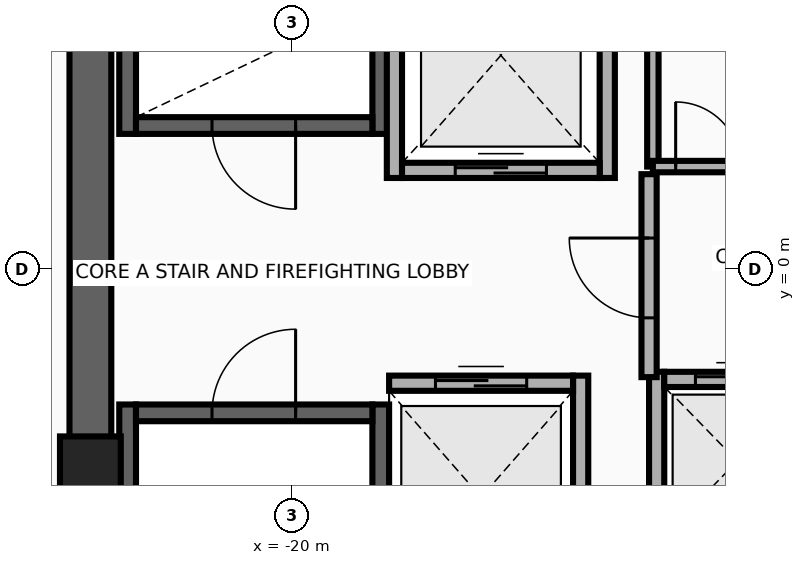
"""IFC4 building model, lengths in metres.
Left out: names, types, materials, properties, quantities, classifications, styles, units other than length and angle.
Written with IfcOpenShell. Run it as: python <this file> out.ifc"""

import sys

from ifc_helpers import new_model, si_unit, direction, frame, frame_2d, origin, origin_2d, place, context, subcontext, project, spatial, rectangle, extrude, source, transform, mapped, element, fill, save


model = new_model("IFC4")
c1 = context("Model", 3, precision=1e-05, world=origin(), true_north=direction((0.0, 1.0)))
c2 = subcontext(c1, "Body", "Model", "MODEL_VIEW")
j1 = project(units=[si_unit("LENGTHUNIT", "METRE"), si_unit("PLANEANGLEUNIT", "RADIAN")], contexts=[c1])
p1 = place(None, origin())
s1 = spatial("IfcSite", under=j1, at=p1, CompositionType="ELEMENT")
p2 = place(p1, origin())
s2 = spatial("IfcBuilding", under=s1, at=p2, CompositionType="ELEMENT")
p3 = place(p2, frame((0.0, 0.0, 244.0)))
s3 = spatial("IfcBuildingStorey", under=s2, at=p3, CompositionType="ELEMENT", Elevation=244.0)
for number, where, z_axis, x_axis in (
    (1, (-22.16, 1.78, 0.0), (0.0, 0.0, 1.0), (0.0, 1.0, 0.0)),
    (2, (-18.83, 1.78, 0.0), (0.0, 0.0, 1.0), (0.0, 1.0, 0.0)),
):
    element("IfcWall", number, at=place(p3, frame(where, z_axis=z_axis, x_axis=x_axis)), inside=s3, PredefinedType="SHEAR", context=c2, shape_type="SweptSolid", body=[
        extrude(rectangle(XDim=8.745, YDim=0.22, at=frame_2d((4.373, 0.0))), origin(), (0.0, 0.0, 1.0), 3.26),
    ])
p4 = place(p3, frame((-22.05, 1.89, 0.0), z_axis=(0.0, 0.0, 1.0), x_axis=(1.0, 0.0, 0.0)))
e3 = element("IfcWall", 3, at=p4, inside=s3, PredefinedType="SHEAR", context=c2, shape_type="SweptSolid", body=[
    extrude(rectangle(XDim=3.11, YDim=0.22, at=frame_2d((1.555, 0.0))), origin(), (0.0, 0.0, 1.0), 3.26),
])
p5 = place(p4, frame((1.0, 0.0, 0.0)))
e4 = element("IfcOpeningElement", 4, at=p5, cuts=e3, PredefinedType="OPENING", context=c2, shape_type="SweptSolid", body=[
    extrude(rectangle(XDim=1.1, YDim=2.15, at=frame_2d((0.55, 1.075))), frame((0.0, 0.125, 0.0), z_axis=(0.0, -1.0, 0.0), x_axis=(1.0, 0.0, 0.0)), (0.0, 0.0, 1.0), 0.25),
])
for number, where, z_axis, x_axis in (
    (5, (-22.16, -10.525, 0.0), (0.0, 0.0, 1.0), (0.0, 1.0, 0.0)),
    (6, (-18.83, -10.525, 0.0), (0.0, 0.0, 1.0), (0.0, 1.0, 0.0)),
):
    element("IfcWall", number, at=place(p3, frame(where, z_axis=z_axis, x_axis=x_axis)), inside=s3, PredefinedType="SHEAR", context=c2, shape_type="SweptSolid", body=[
        extrude(rectangle(XDim=8.745, YDim=0.22, at=frame_2d((4.373, 0.0))), origin(), (0.0, 0.0, 1.0), 3.26),
    ])
p6 = place(p3, frame((-22.05, -1.89, 0.0), z_axis=(0.0, 0.0, 1.0), x_axis=(1.0, 0.0, 0.0)))
e7 = element("IfcWall", 7, at=p6, inside=s3, PredefinedType="SHEAR", context=c2, shape_type="SweptSolid", body=[
    extrude(rectangle(XDim=3.11, YDim=0.22, at=frame_2d((1.555, 0.0))), origin(), (0.0, 0.0, 1.0), 3.26),
])
p7 = place(p6, frame((1.0, 0.0, 0.0)))
e8 = element("IfcOpeningElement", 8, at=p7, cuts=e7, PredefinedType="OPENING", context=c2, shape_type="SweptSolid", body=[
    extrude(rectangle(XDim=1.1, YDim=2.15, at=frame_2d((0.55, 1.075))), frame((0.0, 0.125, 0.0), z_axis=(0.0, -1.0, 0.0), x_axis=(1.0, 0.0, 0.0)), (0.0, 0.0, 1.0), 0.25),
])
p8 = place(p3, frame((-22.65, -11.075, 0.0), z_axis=(0.0, 0.0, 1.0), x_axis=(0.0, 1.0, 0.0)))
e9 = element("IfcWall", 9, at=p8, inside=s3, PredefinedType="SHEAR", context=c2, shape_type="SweptSolid", body=[
    extrude(rectangle(XDim=22.15, YDim=0.55, at=frame_2d((11.075, 0.0))), origin(), (0.0, 0.0, 1.0), 3.26),
])
m1 = source(origin(), c2, "Body", "SweptSolid", [
    extrude(rectangle(XDim=0.8, YDim=0.8, at=origin_2d()), origin(), (0.0, 0.0, 1.0), 3.5),
])
p9 = place(p3, frame((-22.65, -2.6, 0.0), z_axis=(0.0, 0.0, 1.0), x_axis=(1.0, 0.0, 0.0)))
e10 = element("IfcColumn", 10, at=p9, inside=s3, PredefinedType="COLUMN", context=c2, shape_type="MappedRepresentation", body=[
    mapped(m1, transform((0.0, 0.0, 0.0), x_axis=(1.0, 0.0, 0.0), y_axis=(0.0, 1.0, 0.0), z_axis=(0.0, 0.0, 1.0), scale=1.0)),
])
for number, where, z_axis, x_axis in (
    (11, (-18.65, 1.2, 0.0), (0.0, 0.0, 1.0), (0.0, 1.0, 0.0)),
    (12, (-15.85, 1.2, 0.0), (0.0, 0.0, 1.0), (0.0, 1.0, 0.0)),
):
    element("IfcWall", number, at=place(p3, frame(where, z_axis=z_axis, x_axis=x_axis)), inside=s3, PredefinedType="MOVABLE", context=c2, shape_type="SweptSolid", body=[
        extrude(rectangle(XDim=3.225, YDim=0.2, at=frame_2d((1.613, 0.0))), origin(), (0.0, 0.0, 1.0), 3.26),
    ])
p10 = place(p3, frame((-18.55, 1.3, 0.0), z_axis=(0.0, 0.0, 1.0), x_axis=(1.0, 0.0, 0.0)))
e13 = element("IfcWall", 13, at=p10, inside=s3, PredefinedType="MOVABLE", context=c2, shape_type="SweptSolid", body=[
    extrude(rectangle(XDim=2.6, YDim=0.2, at=frame_2d((1.3, 0.0))), origin(), (0.0, 0.0, 1.0), 3.26),
])
p11 = place(p10, frame((0.7, 0.0, 0.0)))
e14 = element("IfcOpeningElement", 14, at=p11, cuts=e13, PredefinedType="OPENING", context=c2, shape_type="SweptSolid", body=[
    extrude(rectangle(XDim=1.2, YDim=2.1, at=frame_2d((0.6, 1.05))), frame((0.0, 0.115, 0.0), z_axis=(0.0, -1.0, 0.0), x_axis=(1.0, 0.0, 0.0)), (0.0, 0.0, 1.0), 0.23),
])
p12 = place(p3, frame((-16.2, -4.6, 0.0), z_axis=(0.0, 0.0, 1.0), x_axis=(0.0, 1.0, 0.0)))
e15 = element("IfcWall", 15, at=p12, inside=s3, PredefinedType="MOVABLE", context=c2, shape_type="SweptSolid", body=[
    extrude(rectangle(XDim=3.2, YDim=0.2, at=frame_2d((1.6, 0.0))), origin(), (0.0, 0.0, 1.0), 3.26),
])
p13 = place(p3, frame((-18.72, -1.5, 0.0), z_axis=(0.0, 0.0, 1.0), x_axis=(1.0, 0.0, 0.0)))
e16 = element("IfcWall", 16, at=p13, inside=s3, PredefinedType="MOVABLE", context=c2, shape_type="SweptSolid", body=[
    extrude(rectangle(XDim=2.42, YDim=0.2, at=frame_2d((1.21, 0.0))), origin(), (0.0, 0.0, 1.0), 3.26),
])
p14 = place(p13, frame((0.61, 0.0, 0.0)))
e17 = element("IfcOpeningElement", 17, at=p14, cuts=e16, PredefinedType="OPENING", context=c2, shape_type="SweptSolid", body=[
    extrude(rectangle(XDim=1.2, YDim=2.1, at=frame_2d((0.6, 1.05))), frame((0.0, 0.115, 0.0), z_axis=(0.0, -1.0, 0.0), x_axis=(1.0, 0.0, 0.0)), (0.0, 0.0, 1.0), 0.23),
])
p15 = place(p3, frame((-15.2, -3.7, 0.0), z_axis=(0.0, 0.0, 1.0), x_axis=(0.0, 1.0, 0.0)))
e18 = element("IfcWall", 18, at=p15, inside=s3, PredefinedType="MOVABLE", context=c2, shape_type="SweptSolid", body=[
    extrude(rectangle(XDim=2.35, YDim=0.2, at=frame_2d((1.175, 0.0))), origin(), (0.0, 0.0, 1.0), 3.26),
])
p16 = place(p3, frame((-15.1, -1.45, 0.0), z_axis=(0.0, 0.0, 1.0), x_axis=(1.0, 0.0, 0.0)))
e19 = element("IfcWall", 19, at=p16, inside=s3, PredefinedType="MOVABLE", context=c2, shape_type="SweptSolid", body=[
    extrude(rectangle(XDim=1.92, YDim=0.2, at=frame_2d((0.96, 0.0))), origin(), (0.0, 0.0, 1.0), 3.26),
])
p17 = place(p16, frame((0.41, 0.0, 0.0)))
e20 = element("IfcOpeningElement", 20, at=p17, cuts=e19, PredefinedType="OPENING", context=c2, shape_type="SweptSolid", body=[
    extrude(rectangle(XDim=1.1, YDim=2.1, at=frame_2d((0.55, 1.05))), frame((0.0, 0.115, 0.0), z_axis=(0.0, -1.0, 0.0), x_axis=(1.0, 0.0, 0.0)), (0.0, 0.0, 1.0), 0.23),
])
p18 = place(p3, frame((-15.3, -1.42, 0.0), z_axis=(0.0, 0.0, 1.0), x_axis=(0.0, 1.0, 0.0)))
e21 = element("IfcWall", 21, at=p18, inside=s3, PredefinedType="PARTITIONING", context=c2, shape_type="SweptSolid", body=[
    extrude(rectangle(XDim=2.67, YDim=0.2, at=frame_2d((1.335, 0.0))), origin(), (0.0, 0.0, 1.0), 3.26),
])
p19 = place(p18, frame((0.78, 0.0, 0.0)))
e22 = element("IfcOpeningElement", 22, at=p19, cuts=e21, PredefinedType="OPENING", context=c2, shape_type="SweptSolid", body=[
    extrude(rectangle(XDim=1.05, YDim=2.15, at=frame_2d((0.525, 1.075))), frame((0.0, 0.115, 0.0), z_axis=(0.0, -1.0, 0.0), x_axis=(1.0, 0.0, 0.0)), (0.0, 0.0, 1.0), 0.23),
])
p20 = place(p3, frame((-15.25, 1.35, 0.0), z_axis=(0.0, 0.0, 1.0), x_axis=(0.0, 1.0, 0.0)))
e23 = element("IfcWall", 23, at=p20, inside=s3, PredefinedType="PARTITIONING", context=c2, shape_type="SweptSolid", body=[
    extrude(rectangle(XDim=1.95, YDim=0.15, at=frame_2d((0.975, 0.0))), origin(), (0.0, 0.0, 1.0), 3.26),
])
p21 = place(p3, frame((-15.25, 1.35, 0.0), z_axis=(0.0, 0.0, 1.0), x_axis=(1.0, 0.0, 0.0)))
e24 = element("IfcWall", 24, at=p21, inside=s3, PredefinedType="PARTITIONING", context=c2, shape_type="SweptSolid", body=[
    extrude(rectangle(XDim=2.1, YDim=0.15, at=frame_2d((1.05, 0.0))), origin(), (0.0, 0.0, 1.0), 3.26),
])
p22 = place(p21, frame((0.3, 0.0, 0.0)))
e25 = element("IfcOpeningElement", 25, at=p22, cuts=e24, PredefinedType="OPENING", context=c2, shape_type="SweptSolid", body=[
    extrude(rectangle(XDim=0.85, YDim=2.05, at=frame_2d((0.425, 1.025))), frame((0.0, 0.09, 0.0), z_axis=(0.0, -1.0, 0.0), x_axis=(1.0, 0.0, 0.0)), (0.0, 0.0, 1.0), 0.18),
])
p23 = place(p11, origin())
e26 = element("IfcDoor", 26, at=p23, inside=s3, OperationType="DOUBLE_DOOR_SLIDING", PredefinedType="DOOR", context=c2, shape_type="SweptSolid", body=[
    extrude(rectangle(XDim=1.2, YDim=2.1, at=frame_2d((0.6, 1.05))), frame((0.0, 0.025, 0.0), z_axis=(0.0, -1.0, 0.0), x_axis=(1.0, 0.0, 0.0)), (0.0, 0.0, 1.0), 0.05),
])
fill(e14, e26)
p24 = place(p14, origin())
e27 = element("IfcDoor", 27, at=p24, inside=s3, OperationType="DOUBLE_DOOR_SLIDING", PredefinedType="DOOR", context=c2, shape_type="SweptSolid", body=[
    extrude(rectangle(XDim=1.2, YDim=2.1, at=frame_2d((0.6, 1.05))), frame((0.0, 0.025, 0.0), z_axis=(0.0, -1.0, 0.0), x_axis=(1.0, 0.0, 0.0)), (0.0, 0.0, 1.0), 0.05),
])
fill(e17, e27)
p25 = place(p17, origin())
e28 = element("IfcDoor", 28, at=p25, inside=s3, OperationType="DOUBLE_DOOR_SLIDING", PredefinedType="DOOR", context=c2, shape_type="SweptSolid", body=[
    extrude(rectangle(XDim=1.1, YDim=2.1, at=frame_2d((0.55, 1.05))), frame((0.0, 0.025, 0.0), z_axis=(0.0, -1.0, 0.0), x_axis=(1.0, 0.0, 0.0)), (0.0, 0.0, 1.0), 0.05),
])
fill(e20, e28)
p26 = place(p19, origin())
e29 = element("IfcDoor", 29, at=p26, inside=s3, OperationType="SINGLE_SWING_RIGHT", PredefinedType="DOOR", context=c2, shape_type="SweptSolid", body=[
    extrude(rectangle(XDim=1.05, YDim=2.15, at=frame_2d((0.525, 1.075))), frame((0.0, 0.025, 0.0), z_axis=(0.0, -1.0, 0.0), x_axis=(1.0, 0.0, 0.0)), (0.0, 0.0, 1.0), 0.05),
])
fill(e22, e29)
p27 = place(p5, frame((1.1, 0.0, 0.0), z_axis=(0.0, 0.0, 1.0), x_axis=(-1.0, 0.0, 0.0)))
e30 = element("IfcDoor", 30, at=p27, inside=s3, OperationType="SINGLE_SWING_LEFT", PredefinedType="DOOR", context=c2, shape_type="SweptSolid", body=[
    extrude(rectangle(XDim=1.1, YDim=2.15, at=frame_2d((0.55, 1.075))), frame((0.0, 0.025, 0.0), z_axis=(0.0, -1.0, 0.0), x_axis=(1.0, 0.0, 0.0)), (0.0, 0.0, 1.0), 0.05),
])
fill(e4, e30)
p28 = place(p7, origin())
e31 = element("IfcDoor", 31, at=p28, inside=s3, OperationType="SINGLE_SWING_RIGHT", PredefinedType="DOOR", context=c2, shape_type="SweptSolid", body=[
    extrude(rectangle(XDim=1.1, YDim=2.15, at=frame_2d((0.55, 1.075))), frame((0.0, 0.025, 0.0), z_axis=(0.0, -1.0, 0.0), x_axis=(1.0, 0.0, 0.0)), (0.0, 0.0, 1.0), 0.05),
])
fill(e8, e31)
p29 = place(p22, origin())
e32 = element("IfcDoor", 32, at=p29, inside=s3, OperationType="SINGLE_SWING_RIGHT", PredefinedType="DOOR", context=c2, shape_type="SweptSolid", body=[
    extrude(rectangle(XDim=0.85, YDim=2.05, at=frame_2d((0.425, 1.025))), frame((0.0, 0.025, 0.0), z_axis=(0.0, -1.0, 0.0), x_axis=(1.0, 0.0, 0.0)), (0.0, 0.0, 1.0), 0.05),
])
fill(e25, e32)
save(model, sys.argv[1])
